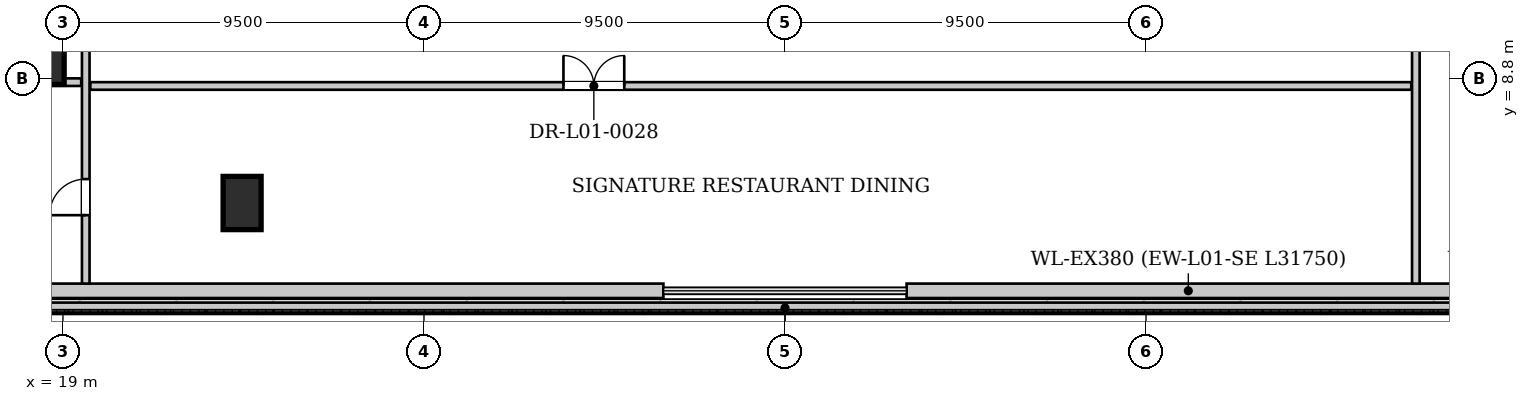
"""IFC4 building model, lengths in metres.
Left out: names, types, materials, properties, quantities, classifications, styles, units other than length and angle.
Written with IfcOpenShell. Run it as: python <this file> out.ifc"""

import sys

from ifc_helpers import new_model, si_unit, direction, frame, frame_2d, origin, origin_2d, place, context, subcontext, project, spatial, rectangle, extrude, source, transform, mapped, element, fill, save


model = new_model("IFC4")
c1 = context("Model", 3, precision=1e-05, world=origin(), true_north=direction((0.0, 1.0)))
c2 = subcontext(c1, "Body", "Model", "MODEL_VIEW")
j1 = project(units=[si_unit("LENGTHUNIT", "METRE"), si_unit("PLANEANGLEUNIT", "RADIAN")], contexts=[c1])
p1 = place(None, origin())
s1 = spatial("IfcSite", under=j1, at=p1, CompositionType="ELEMENT")
p2 = place(p1, origin())
s2 = spatial("IfcBuilding", under=s1, at=p2, CompositionType="ELEMENT")
p3 = place(p2, frame((0.0, 0.0, 5.4)))
s3 = spatial("IfcBuildingStorey", under=s2, at=p3, CompositionType="ELEMENT", Elevation=5.4)
m1 = source(origin(), c2, "Body", "SweptSolid", [
    extrude(rectangle(XDim=1.0, YDim=1.4, at=origin_2d()), origin(), (0.0, 0.0, 1.0), 4.635),
])
for number, where, z_axis, x_axis in (
    (1, (18.532, 9.341, 0.0), (0.0, 0.0, 1.0), (1.0, 0.0, 0.0)),
    (2, (23.714, 5.52, 0.0), (0.0, 0.0, 1.0), (1.0, 0.0, 0.0)),
):
    element("IfcColumn", number, at=place(p3, frame(where, z_axis=z_axis, x_axis=x_axis)), inside=s3, PredefinedType="COLUMN", context=c2, shape_type="MappedRepresentation", body=[
        mapped(m1, transform((0.0, 0.0, 0.0), x_axis=(1.0, 0.0, 0.0), y_axis=(0.0, 1.0, 0.0), z_axis=(0.0, 0.0, 1.0), scale=1.0)),
    ])
p4 = place(p3, frame((72.95, 3.21, 0.0), z_axis=(0.0, 0.0, 1.0), x_axis=(-1.0, 0.0, 0.0)))
e3 = element("IfcWall", 3, at=p4, inside=s3, PredefinedType="SOLIDWALL", context=c2, shape_type="SweptSolid", body=[
    extrude(rectangle(XDim=31.75, YDim=0.38, at=frame_2d((15.875, 0.0))), origin(), (0.0, 0.0, 1.0), 3.872),
])
p5 = place(p4, frame((14.975, 0.0, 0.85)))
e4 = element("IfcOpeningElement", 4, at=p5, cuts=e3, PredefinedType="OPENING", context=c2, shape_type="SweptSolid", body=[
    extrude(rectangle(XDim=1.8, YDim=2.4, at=frame_2d((0.9, 1.2))), frame((0.0, 0.2, 0.0), z_axis=(0.0, -1.0, 0.0), x_axis=(1.0, 0.0, 0.0)), (0.0, 0.0, 1.0), 0.4),
])
p6 = place(p3, frame((34.8, 3.21, 0.0), z_axis=(0.0, 0.0, 1.0), x_axis=(-1.0, 0.0, 0.0)))
e5 = element("IfcWall", 5, at=p6, inside=s3, PredefinedType="SOLIDWALL", context=c2, shape_type="SweptSolid", body=[
    extrude(rectangle(XDim=31.75, YDim=0.38, at=frame_2d((15.875, 0.0))), origin(), (0.0, 0.0, 1.0), 3.872),
])
p7 = place(p6, frame((16.575, 0.0, 0.85)))
e6 = element("IfcOpeningElement", 6, at=p7, cuts=e5, PredefinedType="OPENING", context=c2, shape_type="SweptSolid", body=[
    extrude(rectangle(XDim=1.8, YDim=2.4, at=frame_2d((0.9, 1.2))), frame((0.0, 0.2, 0.0), z_axis=(0.0, -1.0, 0.0), x_axis=(1.0, 0.0, 0.0)), (0.0, 0.0, 1.0), 0.4),
])
p8 = place(p3, frame((2.2, 2.76, 0.0), z_axis=(0.0, 0.0, 1.0), x_axis=(1.0, 0.0, 0.0)))
e7 = element("IfcWall", 7, at=p8, inside=s3, PredefinedType="PARAPET", context=c2, shape_type="SweptSolid", body=[
    extrude(rectangle(XDim=71.6, YDim=0.28, at=frame_2d((35.8, 0.0))), origin(), (0.0, 0.0, 1.0), 0.45),
])
p9 = place(p3, frame((19.6, 3.4, 0.0), z_axis=(0.0, 0.0, 1.0), x_axis=(0.0, 1.0, 0.0)))
e8 = element("IfcWall", 8, at=p9, inside=s3, PredefinedType="PARTITIONING", context=c2, shape_type="SweptSolid", body=[
    extrude(rectangle(XDim=14.6, YDim=0.2, at=frame_2d((7.3, 0.0))), origin(), (0.0, 0.0, 1.0), 3.83),
])
p10 = place(p9, frame((1.8, 0.0, 0.0)))
e9 = element("IfcOpeningElement", 9, at=p10, cuts=e8, PredefinedType="OPENING", context=c2, shape_type="SweptSolid", body=[
    extrude(rectangle(XDim=0.95, YDim=2.1, at=frame_2d((0.475, 1.05))), frame((0.0, 0.11, 0.0), z_axis=(0.0, -1.0, 0.0), x_axis=(1.0, 0.0, 0.0)), (0.0, 0.0, 1.0), 0.22),
])
p11 = place(p9, frame((11.2, 0.0, 0.0)))
e10 = element("IfcOpeningElement", 10, at=p11, cuts=e8, PredefinedType="OPENING", context=c2, shape_type="SweptSolid", body=[
    extrude(rectangle(XDim=1.6, YDim=2.2, at=frame_2d((0.8, 1.1))), frame((0.0, 0.11, 0.0), z_axis=(0.0, -1.0, 0.0), x_axis=(1.0, 0.0, 0.0)), (0.0, 0.0, 1.0), 0.22),
])
p12 = place(p3, frame((3.43, 8.7, 0.0), z_axis=(0.0, 0.0, 1.0), x_axis=(1.0, 0.0, 0.0)))
e11 = element("IfcWall", 11, at=p12, inside=s3, PredefinedType="PARTITIONING", context=c2, shape_type="SweptSolid", body=[
    extrude(rectangle(XDim=16.05, YDim=0.2, at=frame_2d((8.025, 0.0))), origin(), (0.0, 0.0, 1.0), 3.83),
])
p13 = place(p3, frame((19.72, 8.6, 0.0), z_axis=(0.0, 0.0, 1.0), x_axis=(1.0, 0.0, 0.0)))
e12 = element("IfcWall", 12, at=p13, inside=s3, PredefinedType="PARTITIONING", context=c2, shape_type="SweptSolid", body=[
    extrude(rectangle(XDim=34.76, YDim=0.2, at=frame_2d((17.38, 0.0))), origin(), (0.0, 0.0, 1.0), 3.83),
])
p14 = place(p13, frame((12.45, 0.0, 0.0)))
e13 = element("IfcOpeningElement", 13, at=p14, cuts=e12, PredefinedType="OPENING", context=c2, shape_type="SweptSolid", body=[
    extrude(rectangle(XDim=1.6, YDim=2.2, at=frame_2d((0.8, 1.1))), frame((0.0, 0.11, 0.0), z_axis=(0.0, -1.0, 0.0), x_axis=(1.0, 0.0, 0.0)), (0.0, 0.0, 1.0), 0.22),
])
p15 = place(p3, frame((54.6, 3.4, 0.0), z_axis=(0.0, 0.0, 1.0), x_axis=(0.0, 1.0, 0.0)))
e14 = element("IfcWall", 14, at=p15, inside=s3, PredefinedType="PARTITIONING", context=c2, shape_type="SweptSolid", body=[
    extrude(rectangle(XDim=39.4, YDim=0.2, at=frame_2d((19.7, 0.0))), origin(), (0.0, 0.0, 1.0), 3.83),
])
p16 = place(p15, frame((13.8, 0.0, 0.0)))
e15 = element("IfcOpeningElement", 15, at=p16, cuts=e14, PredefinedType="OPENING", context=c2, shape_type="SweptSolid", body=[
    extrude(rectangle(XDim=1.6, YDim=2.2, at=frame_2d((0.8, 1.1))), frame((0.0, 0.11, 0.0), z_axis=(0.0, -1.0, 0.0), x_axis=(1.0, 0.0, 0.0)), (0.0, 0.0, 1.0), 0.22),
])
p17 = place(p15, frame((24.0, 0.0, 0.0)))
e16 = element("IfcOpeningElement", 16, at=p17, cuts=e14, PredefinedType="OPENING", context=c2, shape_type="SweptSolid", body=[
    extrude(rectangle(XDim=1.6, YDim=2.2, at=frame_2d((0.8, 1.1))), frame((0.0, 0.11, 0.0), z_axis=(0.0, -1.0, 0.0), x_axis=(1.0, 0.0, 0.0)), (0.0, 0.0, 1.0), 0.22),
])
m2 = source(origin(), c2, "Body", "SweptSolid", [
    extrude(rectangle(XDim=0.95, YDim=2.1, at=frame_2d((0.475, 1.05))), frame((0.0, 0.025, 0.0), z_axis=(0.0, -1.0, 0.0), x_axis=(1.0, 0.0, 0.0)), (0.0, 0.0, 1.0), 0.05),
])
p18 = place(p10, origin())
e17 = element("IfcDoor", 17, at=p18, inside=s3, OperationType="SINGLE_SWING_LEFT", PredefinedType="DOOR", context=c2, shape_type="MappedRepresentation", body=[
    mapped(m2, transform((0.0, 0.0, 0.0), x_axis=(1.0, 0.0, 0.0), y_axis=(0.0, 1.0, 0.0), z_axis=(0.0, 0.0, 1.0), scale=1.0)),
])
fill(e9, e17)
m3 = source(origin(), c2, "Body", "SweptSolid", [
    extrude(rectangle(XDim=1.6, YDim=2.2, at=frame_2d((0.8, 1.1))), frame((0.0, 0.025, 0.0), z_axis=(0.0, -1.0, 0.0), x_axis=(1.0, 0.0, 0.0)), (0.0, 0.0, 1.0), 0.05),
])
p19 = place(p14, origin())
e18 = element("IfcDoor", 18, at=p19, inside=s3, OperationType="DOUBLE_DOOR_SINGLE_SWING", PredefinedType="DOOR", context=c2, shape_type="MappedRepresentation", body=[
    mapped(m3, transform((0.0, 0.0, 0.0), x_axis=(1.0, 0.0, 0.0), y_axis=(0.0, 1.0, 0.0), z_axis=(0.0, 0.0, 1.0), scale=1.0)),
])
fill(e13, e18)
save(model, sys.argv[1])
